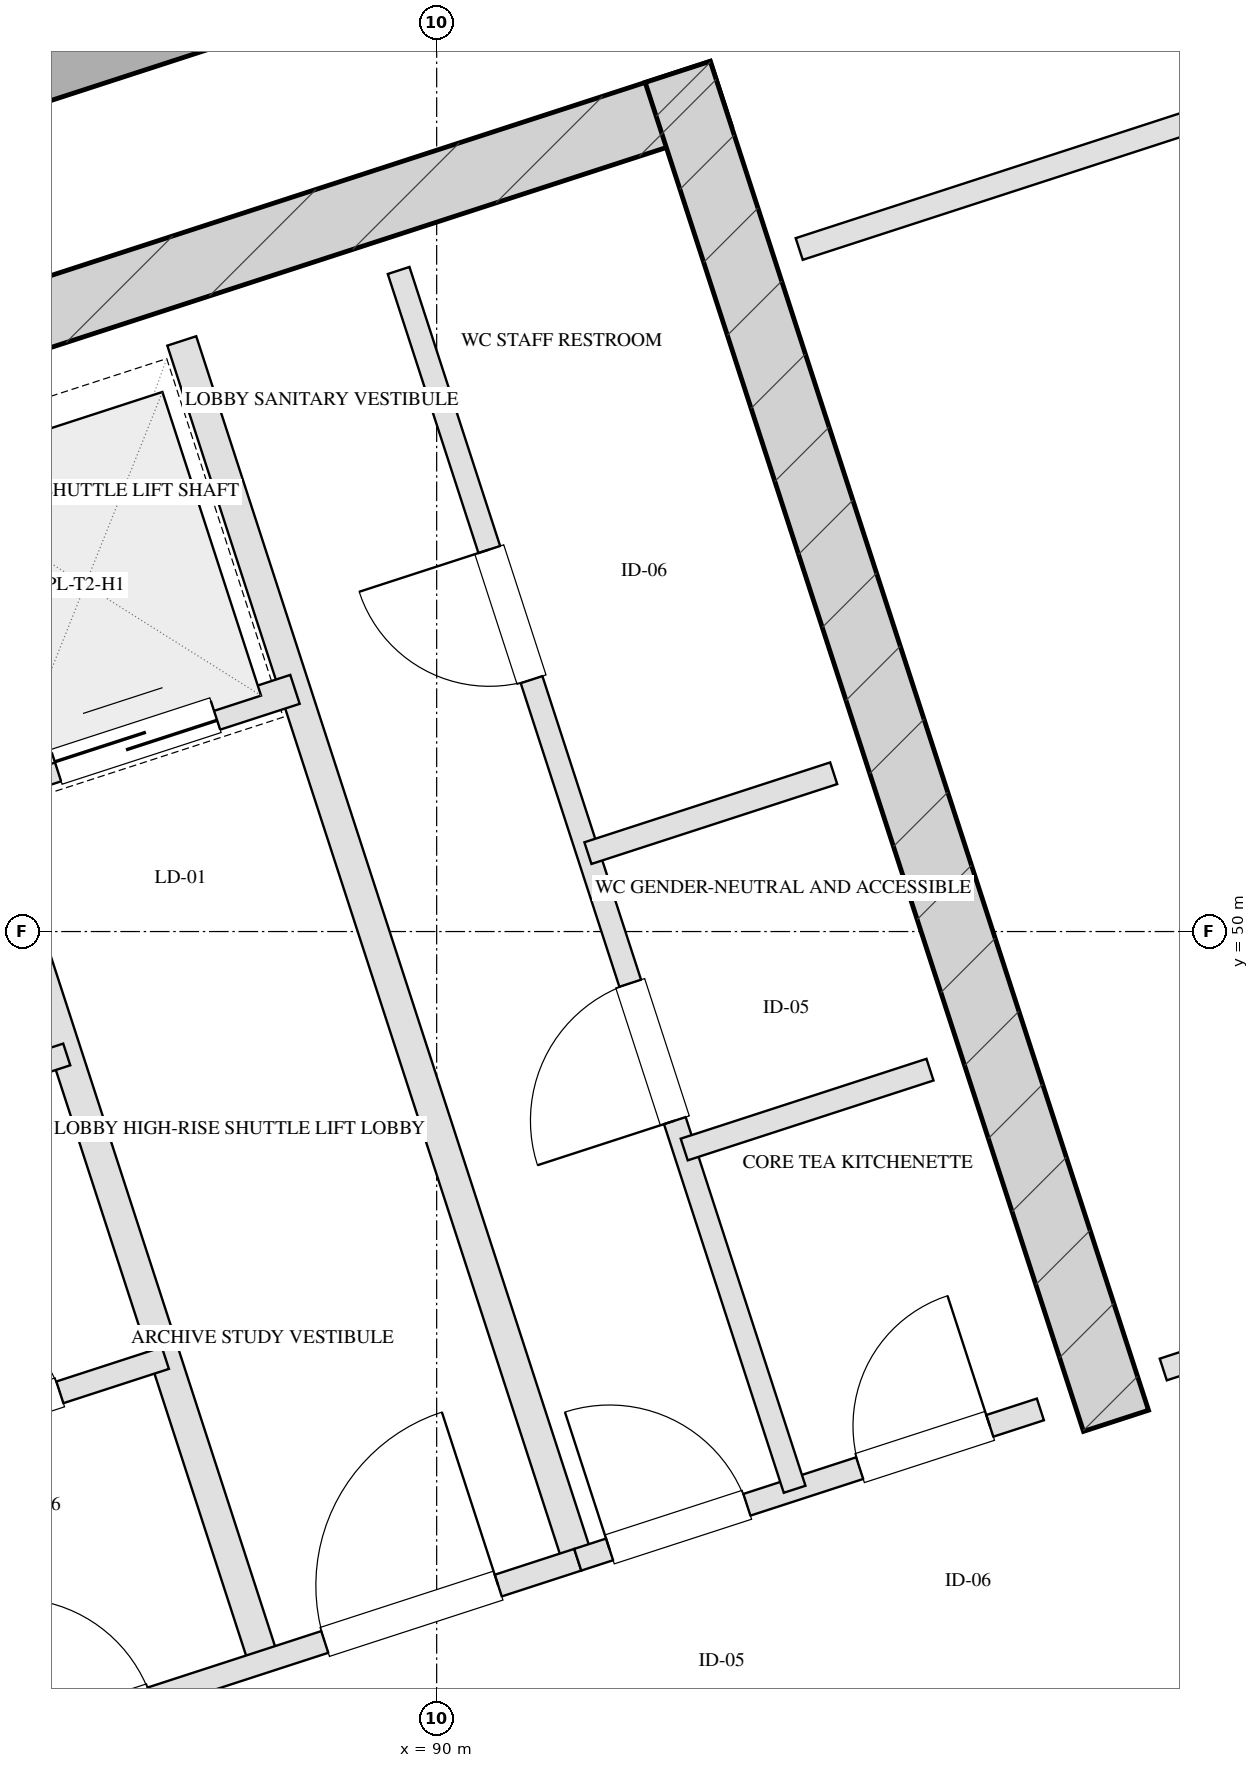
"""IFC4 building model, lengths in metres.
Left out: names, types, materials, properties, quantities, classifications, styles, units other than length and angle.
Written with IfcOpenShell. Run it as: python <this file> out.ifc"""

import sys

from ifc_helpers import new_model, si_unit, direction, frame, frame_2d, origin, origin_2d, place, context, subcontext, project, spatial, rectangle, hollow_rectangle, extrude, element, fill, save


model = new_model("IFC4")
c1 = context("Model", 3, precision=1e-05, world=origin(), true_north=direction((0.0, 1.0)))
c2 = subcontext(c1, "Body", "Model", "MODEL_VIEW")
j1 = project(units=[si_unit("LENGTHUNIT", "METRE"), si_unit("PLANEANGLEUNIT", "RADIAN")], contexts=[c1])
p1 = place(None, origin())
s1 = spatial("IfcSite", under=j1, at=p1, CompositionType="ELEMENT")
p2 = place(p1, origin())
s2 = spatial("IfcBuilding", under=s1, at=p2, CompositionType="ELEMENT")
p3 = place(p2, frame((0.0, 0.0, 223.1)))
s3 = spatial("IfcBuildingStorey", under=s2, at=p3, CompositionType="ELEMENT", Elevation=223.1)
p4 = place(p3, frame((76.415, 50.489, 0.0), z_axis=(0.0, 0.0, 1.0), x_axis=(0.951056810414, 0.309016089169, 0.0)))
e1 = element("IfcWall", 1, at=p4, inside=s3, PredefinedType="SHEAR", context=c2, shape_type="SweptSolid", body=[
    extrude(rectangle(XDim=16.25, YDim=0.45, at=frame_2d((8.125, 0.0))), origin(), (0.0, 0.0, 1.0), 3.45),
])
p5 = place(p3, frame((94.469, 46.781, 0.0), z_axis=(0.0, 0.0, 1.0), x_axis=(-0.309004419953, 0.951060601881, 0.0)))
e2 = element("IfcWall", 2, at=p5, inside=s3, PredefinedType="SHEAR", context=c2, shape_type="SweptSolid", body=[
    extrude(rectangle(XDim=9.33, YDim=0.45, at=frame_2d((4.665, 0.0))), origin(), (0.0, 0.0, 1.0), 3.45),
])
p6 = place(p3, frame((95.572, 56.461, 0.0), z_axis=(0.0, 0.0, 1.0), x_axis=(0.951056516295, 0.309016994375, 0.0)))
e3 = element("IfcColumn", 3, at=p6, inside=s3, PredefinedType="COLUMN", context=c2, shape_type="SweptSolid", body=[
    extrude(hollow_rectangle(XDim=1.15, YDim=1.15, WallThickness=0.04, at=origin_2d()), origin(), (0.0, 0.0, 1.0), 3.451),
])
p7 = place(p3, frame((72.165, 50.706, 0.0), z_axis=(0.0, 0.0, 1.0), x_axis=(0.951058012937, 0.309012388148, 0.0)))
e4 = element("IfcWall", 4, at=p7, inside=s3, PredefinedType="SOLIDWALL", context=c2, shape_type="SweptSolid", body=[
    extrude(rectangle(XDim=23.6, YDim=0.4, at=frame_2d((11.8, 0.0))), origin(), (0.0, 0.0, 1.0), 2.61),
])
p8 = place(p3, frame((90.928, 45.868, 0.0), z_axis=(0.0, 0.0, 1.0), x_axis=(-0.309042196757, 0.951048327176, 0.0)))
e5 = element("IfcWall", 5, at=p8, inside=s3, PredefinedType="PARTITIONING", context=c2, shape_type="SweptSolid", body=[
    extrude(rectangle(XDim=8.43, YDim=0.2, at=frame_2d((4.215, 0.0))), origin(), (0.0, 0.0, 1.0), 3.175),
])
p9 = place(p3, frame((88.864, 45.197, 0.0), z_axis=(0.0, 0.0, 1.0), x_axis=(-0.309007490203, 0.951059604335, 0.0)))
e6 = element("IfcWall", 6, at=p9, inside=s3, PredefinedType="PARTITIONING", context=c2, shape_type="SweptSolid", body=[
    extrude(rectangle(XDim=8.43, YDim=0.2, at=frame_2d((4.215, 0.0))), origin(), (0.0, 0.0, 1.0), 3.175),
])
p10 = place(p3, frame((86.743, 44.508, 0.0), z_axis=(0.0, 0.0, 1.0), x_axis=(0.951063829732, 0.308994485023, 0.0)))
e7 = element("IfcWall", 7, at=p10, inside=s3, PredefinedType="PARTITIONING", context=c2, shape_type="SweptSolid", body=[
    extrude(rectangle(XDim=4.4, YDim=0.15, at=frame_2d((2.2, 0.0))), origin(), (0.0, 0.0, 1.0), 3.175),
])
p11 = place(p10, frame((0.5, 0.0, 0.0)))
e8 = element("IfcOpeningElement", 8, at=p11, cuts=e7, PredefinedType="OPENING", context=c2, shape_type="SweptSolid", body=[
    extrude(rectangle(XDim=0.95, YDim=2.05, at=frame_2d((0.475, 1.025))), frame((0.0, 0.085, 0.0), z_axis=(0.0, -1.0, 0.0), x_axis=(1.0, 0.0, 0.0)), (0.0, 0.0, 1.0), 0.17),
])
p12 = place(p10, frame((2.65, 0.0, 0.0)))
e9 = element("IfcOpeningElement", 9, at=p12, cuts=e7, PredefinedType="OPENING", context=c2, shape_type="SweptSolid", body=[
    extrude(rectangle(XDim=1.2, YDim=2.05, at=frame_2d((0.6, 1.025))), frame((0.0, 0.085, 0.0), z_axis=(0.0, -1.0, 0.0), x_axis=(1.0, 0.0, 0.0)), (0.0, 0.0, 1.0), 0.17),
])
p13 = place(p3, frame((85.446, 48.502, 0.0), z_axis=(0.0, 0.0, 1.0), x_axis=(0.951075093106, 0.308959814982, 0.0)))
e10 = element("IfcWall", 10, at=p13, inside=s3, PredefinedType="PARTITIONING", context=c2, shape_type="SweptSolid", body=[
    extrude(rectangle(XDim=2.23, YDim=0.15, at=frame_2d((1.115, 0.0))), origin(), (0.0, 0.0, 1.0), 3.175),
])
p14 = place(p3, frame((86.094, 46.505, 0.0), z_axis=(0.0, 0.0, 1.0), x_axis=(0.951042918244, 0.309058841741, 0.0)))
e11 = element("IfcWall", 11, at=p14, inside=s3, PredefinedType="PARTITIONING", context=c2, shape_type="SweptSolid", body=[
    extrude(rectangle(XDim=2.23, YDim=0.15, at=frame_2d((1.115, 0.0))), origin(), (0.0, 0.0, 1.0), 3.175),
])
p15 = place(p14, frame((0.6, 0.0, 0.0)))
e12 = element("IfcOpeningElement", 12, at=p15, cuts=e11, PredefinedType="OPENING", context=c2, shape_type="SweptSolid", body=[
    extrude(rectangle(XDim=0.9, YDim=2.05, at=frame_2d((0.45, 1.025))), frame((0.0, 0.085, 0.0), z_axis=(0.0, -1.0, 0.0), x_axis=(1.0, 0.0, 0.0)), (0.0, 0.0, 1.0), 0.17),
])
p16 = place(p3, frame((87.004, 50.922, 0.0), z_axis=(0.0, 0.0, 1.0), x_axis=(0.951041509718, 0.309063176055, 0.0)))
e13 = element("IfcWall", 13, at=p16, inside=s3, PredefinedType="PARTITIONING", context=c2, shape_type="SweptSolid", body=[
    extrude(rectangle(XDim=2.17, YDim=0.2, at=frame_2d((1.085, 0.0))), origin(), (0.0, 0.0, 1.0), 3.175),
])
p17 = place(p16, frame((0.52, 0.0, 0.0)))
e14 = element("IfcOpeningElement", 14, at=p17, cuts=e13, PredefinedType="OPENING", context=c2, shape_type="SweptSolid", body=[
    extrude(rectangle(XDim=1.1, YDim=2.05, at=frame_2d((0.55, 1.025))), frame((0.0, 0.11, 0.0), z_axis=(0.0, -1.0, 0.0), x_axis=(1.0, 0.0, 0.0)), (0.0, 0.0, 1.0), 0.22),
])
p18 = place(p3, frame((90.928, 45.868, 0.0), z_axis=(0.0, 0.0, 1.0), x_axis=(0.951059297078, 0.309008435874, 0.0)))
e15 = element("IfcWall", 15, at=p18, inside=s3, PredefinedType="PARTITIONING", context=c2, shape_type="SweptSolid", body=[
    extrude(rectangle(XDim=3.2, YDim=0.15, at=frame_2d((1.6, 0.0))), origin(), (0.0, 0.0, 1.0), 3.175),
])
p19 = place(p18, frame((0.22, 0.0, 0.0)))
e16 = element("IfcOpeningElement", 16, at=p19, cuts=e15, PredefinedType="OPENING", context=c2, shape_type="SweptSolid", body=[
    extrude(rectangle(XDim=0.95, YDim=2.05, at=frame_2d((0.475, 1.025))), frame((0.0, 0.085, 0.0), z_axis=(0.0, -1.0, 0.0), x_axis=(1.0, 0.0, 0.0)), (0.0, 0.0, 1.0), 0.17),
])
p20 = place(p18, frame((1.95, 0.0, 0.0)))
e17 = element("IfcOpeningElement", 17, at=p20, cuts=e15, PredefinedType="OPENING", context=c2, shape_type="SweptSolid", body=[
    extrude(rectangle(XDim=0.9, YDim=2.05, at=frame_2d((0.45, 1.025))), frame((0.0, 0.085, 0.0), z_axis=(0.0, -1.0, 0.0), x_axis=(1.0, 0.0, 0.0)), (0.0, 0.0, 1.0), 0.17),
])
p21 = place(p3, frame((92.355, 46.331, 0.0), z_axis=(0.0, 0.0, 1.0), x_axis=(-0.309007490203, 0.951059604335, 0.0)))
e18 = element("IfcWall", 18, at=p21, inside=s3, PredefinedType="PARTITIONING", context=c2, shape_type="SweptSolid", body=[
    extrude(rectangle(XDim=8.43, YDim=0.15, at=frame_2d((4.215, 0.0))), origin(), (0.0, 0.0, 1.0), 3.175),
])
p22 = place(p21, frame((2.55, 0.0, 0.0)))
e19 = element("IfcOpeningElement", 19, at=p22, cuts=e18, PredefinedType="OPENING", context=c2, shape_type="SweptSolid", body=[
    extrude(rectangle(XDim=0.95, YDim=2.05, at=frame_2d((0.475, 1.025))), frame((0.0, 0.085, 0.0), z_axis=(0.0, -1.0, 0.0), x_axis=(1.0, 0.0, 0.0)), (0.0, 0.0, 1.0), 0.17),
])
p23 = place(p21, frame((5.6, 0.0, 0.0)))
e20 = element("IfcOpeningElement", 20, at=p23, cuts=e18, PredefinedType="OPENING", context=c2, shape_type="SweptSolid", body=[
    extrude(rectangle(XDim=0.9, YDim=2.05, at=frame_2d((0.45, 1.025))), frame((0.0, 0.085, 0.0), z_axis=(0.0, -1.0, 0.0), x_axis=(1.0, 0.0, 0.0)), (0.0, 0.0, 1.0), 0.17),
])
p24 = place(p3, frame((90.995, 50.516, 0.0), z_axis=(0.0, 0.0, 1.0), x_axis=(0.951040401051, 0.309066587596, 0.0)))
e21 = element("IfcWall", 21, at=p24, inside=s3, PredefinedType="PARTITIONING", context=c2, shape_type="SweptSolid", body=[
    extrude(rectangle(XDim=1.7, YDim=0.15, at=frame_2d((0.85, 0.0))), origin(), (0.0, 0.0, 1.0), 3.175),
])
p25 = place(p3, frame((91.628, 48.566, 0.0), z_axis=(0.0, 0.0, 1.0), x_axis=(0.951054116971, 0.309024378638, 0.0)))
e22 = element("IfcWall", 22, at=p25, inside=s3, PredefinedType="PARTITIONING", context=c2, shape_type="SweptSolid", body=[
    extrude(rectangle(XDim=1.7, YDim=0.15, at=frame_2d((0.85, 0.0))), origin(), (0.0, 0.0, 1.0), 3.175),
])
p26 = place(p3, frame((92.385, 54.49, 0.0), z_axis=(0.0, 0.0, 1.0), x_axis=(0.951055112834, 0.309021313752, 0.0)))
e23 = element("IfcWall", 23, at=p26, inside=s3, PredefinedType="PARTITIONING", context=c2, shape_type="SweptSolid", body=[
    extrude(rectangle(XDim=5.2, YDim=0.15, at=frame_2d((2.6, 0.0))), origin(), (0.0, 0.0, 1.0), 3.175),
])
p27 = place(p3, frame((94.78, 47.119, 0.0), z_axis=(0.0, 0.0, 1.0), x_axis=(0.951055112834, 0.309021313752, 0.0)))
e24 = element("IfcWall", 24, at=p27, inside=s3, PredefinedType="PARTITIONING", context=c2, shape_type="SweptSolid", body=[
    extrude(rectangle(XDim=5.2, YDim=0.15, at=frame_2d((2.6, 0.0))), origin(), (0.0, 0.0, 1.0), 3.175),
])
p28 = place(p27, frame((2.184, 0.0, 0.0)))
e25 = element("IfcOpeningElement", 25, at=p28, cuts=e24, PredefinedType="OPENING", context=c2, shape_type="SweptSolid", body=[
    extrude(rectangle(XDim=0.85, YDim=2.05, at=frame_2d((0.425, 1.025))), frame((0.0, 0.085, 0.0), z_axis=(0.0, -1.0, 0.0), x_axis=(1.0, 0.0, 0.0)), (0.0, 0.0, 1.0), 0.17),
])
p29 = place(p12, origin())
e26 = element("IfcDoor", 26, at=p29, inside=s3, OperationType="SINGLE_SWING_RIGHT", PredefinedType="DOOR", context=c2, shape_type="SweptSolid", body=[
    extrude(rectangle(XDim=1.2, YDim=2.05, at=frame_2d((0.6, 1.025))), frame((0.0, 0.025, 0.0), z_axis=(0.0, -1.0, 0.0), x_axis=(1.0, 0.0, 0.0)), (0.0, 0.0, 1.0), 0.05),
])
fill(e9, e26)
p30 = place(p15, origin())
e27 = element("IfcDoor", 27, at=p30, inside=s3, OperationType="SINGLE_SWING_LEFT", PredefinedType="DOOR", context=c2, shape_type="SweptSolid", body=[
    extrude(rectangle(XDim=0.9, YDim=2.05, at=frame_2d((0.45, 1.025))), frame((0.0, 0.025, 0.0), z_axis=(0.0, -1.0, 0.0), x_axis=(1.0, 0.0, 0.0)), (0.0, 0.0, 1.0), 0.05),
])
fill(e12, e27)
p31 = place(p17, origin())
e28 = element("IfcDoor", 28, at=p31, inside=s3, OperationType="DOUBLE_DOOR_SLIDING", PredefinedType="DOOR", context=c2, shape_type="SweptSolid", body=[
    extrude(rectangle(XDim=1.1, YDim=2.05, at=frame_2d((0.55, 1.025))), frame((0.0, 0.025, 0.0), z_axis=(0.0, -1.0, 0.0), x_axis=(1.0, 0.0, 0.0)), (0.0, 0.0, 1.0), 0.05),
])
fill(e14, e28)
p32 = place(p19, origin())
e29 = element("IfcDoor", 29, at=p32, inside=s3, OperationType="SINGLE_SWING_LEFT", PredefinedType="DOOR", context=c2, shape_type="SweptSolid", body=[
    extrude(rectangle(XDim=0.95, YDim=2.05, at=frame_2d((0.475, 1.025))), frame((0.0, 0.025, 0.0), z_axis=(0.0, -1.0, 0.0), x_axis=(1.0, 0.0, 0.0)), (0.0, 0.0, 1.0), 0.05),
])
fill(e16, e29)
p33 = place(p20, origin())
e30 = element("IfcDoor", 30, at=p33, inside=s3, OperationType="SINGLE_SWING_RIGHT", PredefinedType="DOOR", context=c2, shape_type="SweptSolid", body=[
    extrude(rectangle(XDim=0.9, YDim=2.05, at=frame_2d((0.45, 1.025))), frame((0.0, 0.025, 0.0), z_axis=(0.0, -1.0, 0.0), x_axis=(1.0, 0.0, 0.0)), (0.0, 0.0, 1.0), 0.05),
])
fill(e17, e30)
p34 = place(p22, origin())
e31 = element("IfcDoor", 31, at=p34, inside=s3, OperationType="SINGLE_SWING_LEFT", PredefinedType="DOOR", context=c2, shape_type="SweptSolid", body=[
    extrude(rectangle(XDim=0.95, YDim=2.05, at=frame_2d((0.475, 1.025))), frame((0.0, 0.025, 0.0), z_axis=(0.0, -1.0, 0.0), x_axis=(1.0, 0.0, 0.0)), (0.0, 0.0, 1.0), 0.05),
])
fill(e19, e31)
p35 = place(p23, origin())
e32 = element("IfcDoor", 32, at=p35, inside=s3, OperationType="SINGLE_SWING_RIGHT", PredefinedType="DOOR", context=c2, shape_type="SweptSolid", body=[
    extrude(rectangle(XDim=0.9, YDim=2.05, at=frame_2d((0.45, 1.025))), frame((0.0, 0.025, 0.0), z_axis=(0.0, -1.0, 0.0), x_axis=(1.0, 0.0, 0.0)), (0.0, 0.0, 1.0), 0.05),
])
fill(e20, e32)
save(model, sys.argv[1])
